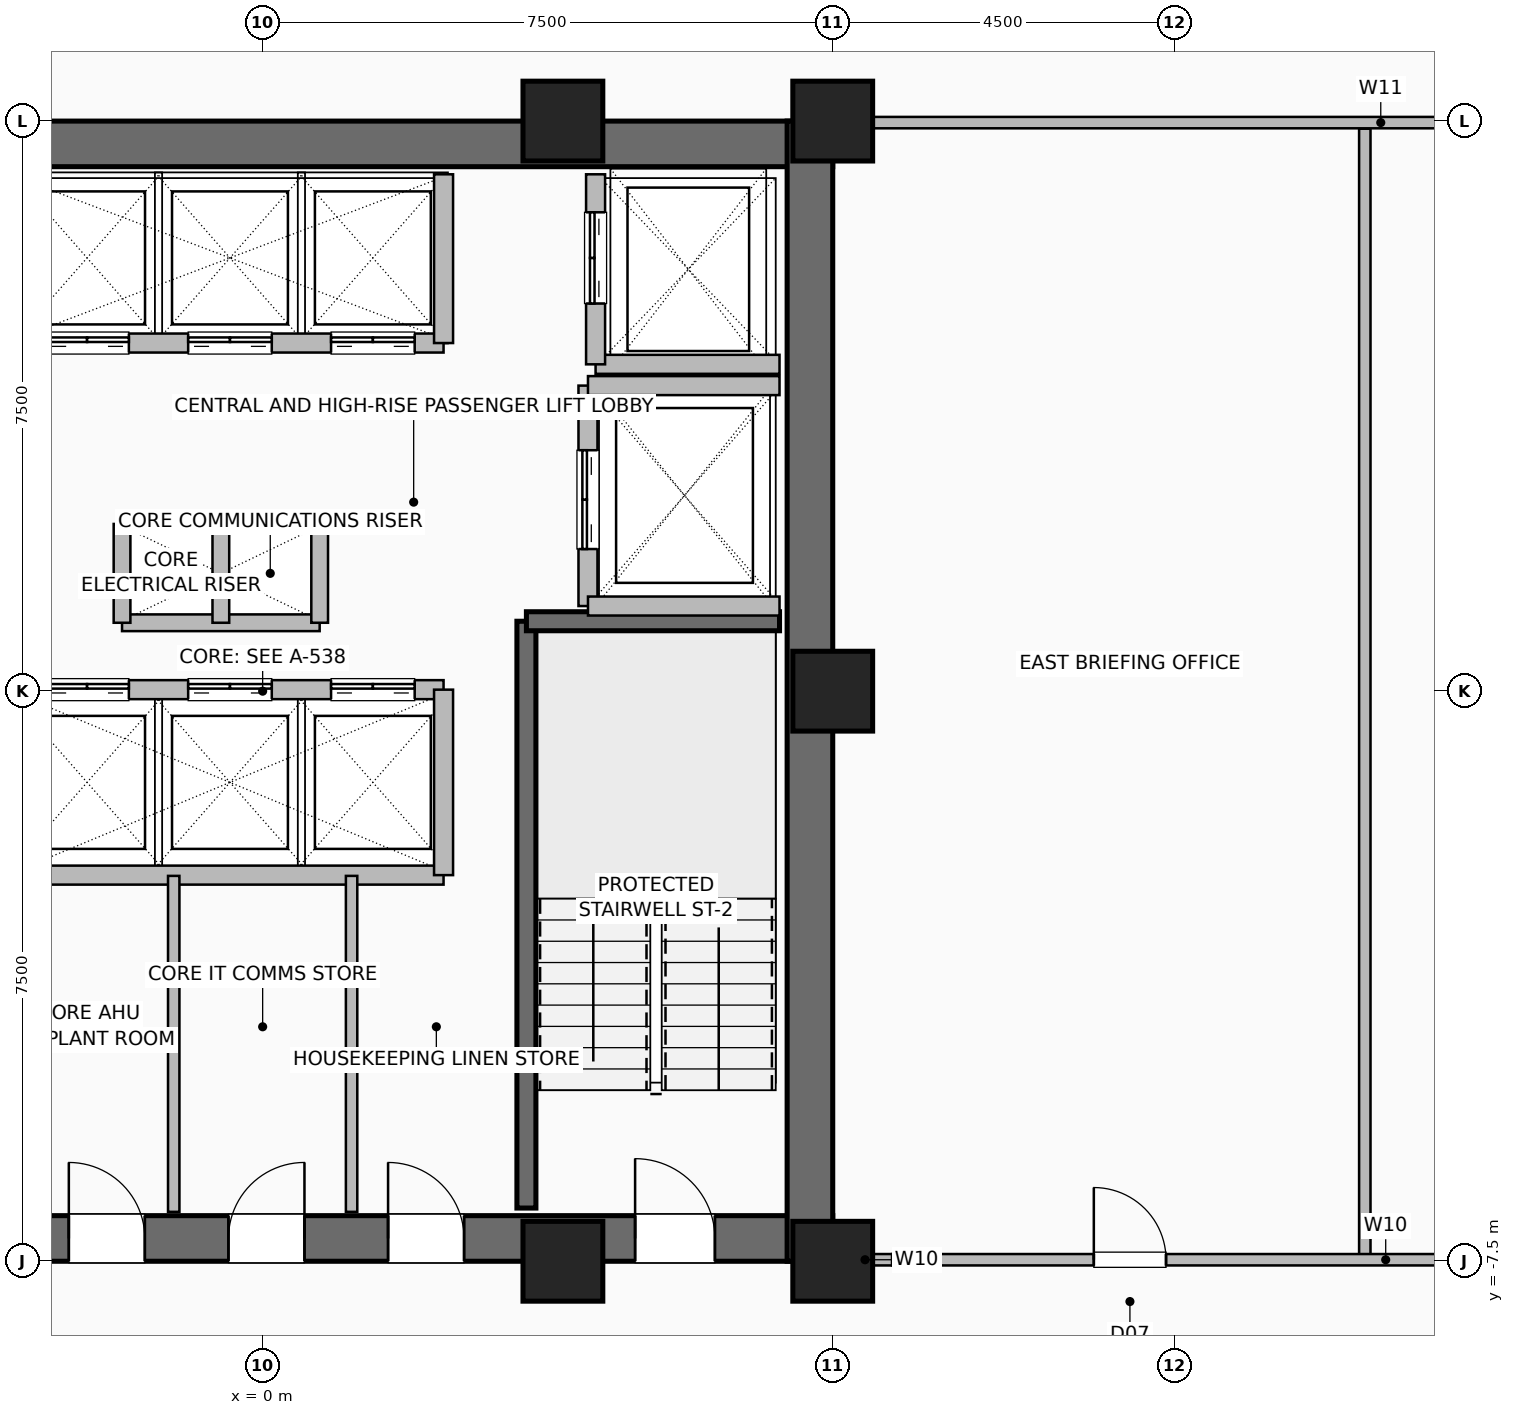
"""IFC4 building model, lengths in metres.
Left out: names, types, materials, properties, quantities, classifications, styles, units other than length and angle.
Written with IfcOpenShell. Run it as: python <this file> out.ifc"""

import sys

from ifc_helpers import new_model, si_unit, direction, frame, frame_2d, origin, origin_2d, place, context, subcontext, project, spatial, rectangle, hollow_rectangle, extrude, element, fill, save


model = new_model("IFC4")
c1 = context("Model", 3, precision=1e-05, world=origin(), true_north=direction((0.0, 1.0)))
c2 = subcontext(c1, "Body", "Model", "MODEL_VIEW")
j1 = project(units=[si_unit("LENGTHUNIT", "METRE"), si_unit("PLANEANGLEUNIT", "RADIAN")], contexts=[c1])
p1 = place(None, origin())
s1 = spatial("IfcSite", under=j1, at=p1, CompositionType="ELEMENT")
p2 = place(p1, origin())
s2 = spatial("IfcBuilding", under=s1, at=p2, CompositionType="ELEMENT")
p3 = place(p2, frame((0.0, 0.0, 144.4)))
s3 = spatial("IfcBuildingStorey", under=s2, at=p3, CompositionType="ELEMENT", Elevation=144.4)
for number, where, z_axis, x_axis in (
    (1, (3.95, -7.5, 0.0), (0.0, 0.0, 1.0), (1.0, 0.0, 0.0)),
    (2, (7.5, -7.5, 0.0), (0.0, 0.0, 1.0), (1.0, 0.0, 0.0)),
    (3, (7.5, 0.0, 0.0), (0.0, 0.0, 1.0), (1.0, 0.0, 0.0)),
    (4, (7.5, 7.5, 0.0), (0.0, 0.0, 1.0), (1.0, 0.0, 0.0)),
    (5, (3.95, 7.5, 0.0), (0.0, 0.0, 1.0), (1.0, 0.0, 0.0)),
):
    element("IfcColumn", number, at=place(p3, frame(where, z_axis=z_axis, x_axis=x_axis)), inside=s3, PredefinedType="COLUMN", context=c2, shape_type="SweptSolid", body=[
        extrude(hollow_rectangle(XDim=1.05, YDim=1.05, WallThickness=0.05, at=origin_2d()), origin(), (0.0, 0.0, 1.0), 3.6),
    ])
p4 = place(p3, frame((-7.5, -7.2, 0.0), z_axis=(0.0, 0.0, 1.0), x_axis=(1.0, 0.0, 0.0)))
e6 = element("IfcWall", 6, at=p4, inside=s3, PredefinedType="SHEAR", context=c2, shape_type="SweptSolid", body=[
    extrude(rectangle(XDim=15.0, YDim=0.6, at=frame_2d((7.5, 0.0))), origin(), (0.0, 0.0, 1.0), 3.36),
])
p5 = place(p4, frame((1.55, 0.0, 0.0)))
e7 = element("IfcOpeningElement", 7, at=p5, cuts=e6, PredefinedType="OPENING", context=c2, shape_type="SweptSolid", body=[
    extrude(rectangle(XDim=1.05, YDim=2.08, at=frame_2d((0.525, 1.04))), frame((0.0, 0.31, 0.0), z_axis=(0.0, -1.0, 0.0), x_axis=(1.0, 0.0, 0.0)), (0.0, 0.0, 1.0), 0.62),
])
p6 = place(p4, frame((12.4, 0.0, 0.0)))
e8 = element("IfcOpeningElement", 8, at=p6, cuts=e6, PredefinedType="OPENING", context=c2, shape_type="SweptSolid", body=[
    extrude(rectangle(XDim=1.05, YDim=2.08, at=frame_2d((0.525, 1.04))), frame((0.0, 0.31, 0.0), z_axis=(0.0, -1.0, 0.0), x_axis=(1.0, 0.0, 0.0)), (0.0, 0.0, 1.0), 0.62),
])
p7 = place(p4, frame((4.95, 0.0, 0.0)))
e9 = element("IfcOpeningElement", 9, at=p7, cuts=e6, PredefinedType="OPENING", context=c2, shape_type="SweptSolid", body=[
    extrude(rectangle(XDim=1.0, YDim=2.08, at=frame_2d((0.5, 1.04))), frame((0.0, 0.31, 0.0), z_axis=(0.0, -1.0, 0.0), x_axis=(1.0, 0.0, 0.0)), (0.0, 0.0, 1.0), 0.62),
])
p8 = place(p4, frame((7.05, 0.0, 0.0)))
e10 = element("IfcOpeningElement", 10, at=p8, cuts=e6, PredefinedType="OPENING", context=c2, shape_type="SweptSolid", body=[
    extrude(rectangle(XDim=1.0, YDim=2.08, at=frame_2d((0.5, 1.04))), frame((0.0, 0.31, 0.0), z_axis=(0.0, -1.0, 0.0), x_axis=(1.0, 0.0, 0.0)), (0.0, 0.0, 1.0), 0.62),
])
p9 = place(p4, frame((9.15, 0.0, 0.0)))
e11 = element("IfcOpeningElement", 11, at=p9, cuts=e6, PredefinedType="OPENING", context=c2, shape_type="SweptSolid", body=[
    extrude(rectangle(XDim=1.0, YDim=2.08, at=frame_2d((0.5, 1.04))), frame((0.0, 0.31, 0.0), z_axis=(0.0, -1.0, 0.0), x_axis=(1.0, 0.0, 0.0)), (0.0, 0.0, 1.0), 0.62),
])
for number, where, z_axis, x_axis in (
    (12, (-7.5, 7.2, 0.0), (0.0, 0.0, 1.0), (1.0, 0.0, 0.0)),
    (13, (7.2, -7.5, 0.0), (0.0, 0.0, 1.0), (0.0, 1.0, 0.0)),
):
    element("IfcWall", number, at=place(p3, frame(where, z_axis=z_axis, x_axis=x_axis)), inside=s3, PredefinedType="SHEAR", context=c2, shape_type="SweptSolid", body=[
        extrude(rectangle(XDim=15.0, YDim=0.6, at=frame_2d((7.5, 0.0))), origin(), (0.0, 0.0, 1.0), 3.36),
    ])
p10 = place(p3, frame((3.47, -6.8, 0.0), z_axis=(0.0, 0.0, 1.0), x_axis=(0.0, 1.0, 0.0)))
e14 = element("IfcWall", 14, at=p10, inside=s3, PredefinedType="SHEAR", context=c2, shape_type="SweptSolid", body=[
    extrude(rectangle(XDim=7.72, YDim=0.25, at=frame_2d((3.86, 0.0))), origin(), (0.0, 0.0, 1.0), 3.36),
])
p11 = place(p3, frame((3.47, 0.92, 0.0), z_axis=(0.0, 0.0, 1.0), x_axis=(1.0, 0.0, 0.0)))
e15 = element("IfcWall", 15, at=p11, inside=s3, PredefinedType="SHEAR", context=c2, shape_type="SweptSolid", body=[
    extrude(rectangle(XDim=3.33, YDim=0.25, at=frame_2d((1.665, 0.0))), origin(), (0.0, 0.0, 1.0), 3.36),
])
for number, where, z_axis, x_axis in (
    (16, (-1.85, 2.2, 0.0), (0.0, 0.0, 1.0), (1.0, 0.0, 0.0)),
    (17, (-1.85, 0.9, 0.0), (0.0, 0.0, 1.0), (1.0, 0.0, 0.0)),
):
    element("IfcWall", number, at=place(p3, frame(where, z_axis=z_axis, x_axis=x_axis)), inside=s3, PredefinedType="PARTITIONING", context=c2, shape_type="SweptSolid", body=[
        extrude(rectangle(XDim=2.6, YDim=0.22, at=frame_2d((1.3, 0.0))), origin(), (0.0, 0.0, 1.0), 3.36),
    ])
for number, where, z_axis, x_axis in (
    (18, (-0.55, 0.9, 0.0), (0.0, 0.0, 1.0), (0.0, 1.0, 0.0)),
    (19, (0.75, 0.9, 0.0), (0.0, 0.0, 1.0), (0.0, 1.0, 0.0)),
    (20, (-1.85, 0.9, 0.0), (0.0, 0.0, 1.0), (0.0, 1.0, 0.0)),
):
    element("IfcWall", number, at=place(p3, frame(where, z_axis=z_axis, x_axis=x_axis)), inside=s3, PredefinedType="PARTITIONING", context=c2, shape_type="SweptSolid", body=[
        extrude(rectangle(XDim=1.3, YDim=0.22, at=frame_2d((0.65, 0.0))), origin(), (0.0, 0.0, 1.0), 3.36),
    ])
p12 = place(p3, frame((-3.26, 0.02, 0.0), z_axis=(0.0, 0.0, 1.0), x_axis=(1.0, 0.0, 0.0)))
e21 = element("IfcWall", 21, at=p12, inside=s3, PredefinedType="SHEAR", context=c2, shape_type="SweptSolid", body=[
    extrude(rectangle(XDim=5.64, YDim=0.25, at=frame_2d((2.82, 0.0))), origin(), (0.0, 0.0, 1.0), 3.36),
])
p13 = place(p12, frame((0.4, 0.0, 0.0)))
e22 = element("IfcOpeningElement", 22, at=p13, cuts=e21, PredefinedType="OPENING", context=c2, shape_type="SweptSolid", body=[
    extrude(rectangle(XDim=1.1, YDim=2.2, at=frame_2d((0.55, 1.1))), frame((0.0, 0.135, 0.0), z_axis=(0.0, -1.0, 0.0), x_axis=(1.0, 0.0, 0.0)), (0.0, 0.0, 1.0), 0.27),
])
p14 = place(p12, frame((2.28, 0.0, 0.0)))
e23 = element("IfcOpeningElement", 23, at=p14, cuts=e21, PredefinedType="OPENING", context=c2, shape_type="SweptSolid", body=[
    extrude(rectangle(XDim=1.1, YDim=2.2, at=frame_2d((0.55, 1.1))), frame((0.0, 0.135, 0.0), z_axis=(0.0, -1.0, 0.0), x_axis=(1.0, 0.0, 0.0)), (0.0, 0.0, 1.0), 0.27),
])
p15 = place(p12, frame((4.16, 0.0, 0.0)))
e24 = element("IfcOpeningElement", 24, at=p15, cuts=e21, PredefinedType="OPENING", context=c2, shape_type="SweptSolid", body=[
    extrude(rectangle(XDim=1.1, YDim=2.2, at=frame_2d((0.55, 1.1))), frame((0.0, 0.135, 0.0), z_axis=(0.0, -1.0, 0.0), x_axis=(1.0, 0.0, 0.0)), (0.0, 0.0, 1.0), 0.27),
])
p16 = place(p3, frame((-3.26, -2.42, 0.0), z_axis=(0.0, 0.0, 1.0), x_axis=(1.0, 0.0, 0.0)))
e25 = element("IfcWall", 25, at=p16, inside=s3, PredefinedType="SHEAR", context=c2, shape_type="SweptSolid", body=[
    extrude(rectangle(XDim=5.64, YDim=0.25, at=frame_2d((2.82, 0.0))), origin(), (0.0, 0.0, 1.0), 3.36),
])
p17 = place(p3, frame((2.38, -2.42, 0.0), z_axis=(0.0, 0.0, 1.0), x_axis=(0.0, 1.0, 0.0)))
e26 = element("IfcWall", 26, at=p17, inside=s3, PredefinedType="SHEAR", context=c2, shape_type="SweptSolid", body=[
    extrude(rectangle(XDim=2.44, YDim=0.25, at=frame_2d((1.22, 0.0))), origin(), (0.0, 0.0, 1.0), 3.36),
])
p18 = place(p3, frame((-3.26, 4.58, 0.0), z_axis=(0.0, 0.0, 1.0), x_axis=(1.0, 0.0, 0.0)))
e27 = element("IfcWall", 27, at=p18, inside=s3, PredefinedType="SHEAR", context=c2, shape_type="SweptSolid", body=[
    extrude(rectangle(XDim=5.64, YDim=0.25, at=frame_2d((2.82, 0.0))), origin(), (0.0, 0.0, 1.0), 3.36),
])
p19 = place(p18, frame((0.4, 0.0, 0.0)))
e28 = element("IfcOpeningElement", 28, at=p19, cuts=e27, PredefinedType="OPENING", context=c2, shape_type="SweptSolid", body=[
    extrude(rectangle(XDim=1.1, YDim=2.2, at=frame_2d((0.55, 1.1))), frame((0.0, 0.135, 0.0), z_axis=(0.0, -1.0, 0.0), x_axis=(1.0, 0.0, 0.0)), (0.0, 0.0, 1.0), 0.27),
])
p20 = place(p18, frame((2.28, 0.0, 0.0)))
e29 = element("IfcOpeningElement", 29, at=p20, cuts=e27, PredefinedType="OPENING", context=c2, shape_type="SweptSolid", body=[
    extrude(rectangle(XDim=1.1, YDim=2.2, at=frame_2d((0.55, 1.1))), frame((0.0, 0.135, 0.0), z_axis=(0.0, -1.0, 0.0), x_axis=(1.0, 0.0, 0.0)), (0.0, 0.0, 1.0), 0.27),
])
p21 = place(p18, frame((4.16, 0.0, 0.0)))
e30 = element("IfcOpeningElement", 30, at=p21, cuts=e27, PredefinedType="OPENING", context=c2, shape_type="SweptSolid", body=[
    extrude(rectangle(XDim=1.1, YDim=2.2, at=frame_2d((0.55, 1.1))), frame((0.0, 0.135, 0.0), z_axis=(0.0, -1.0, 0.0), x_axis=(1.0, 0.0, 0.0)), (0.0, 0.0, 1.0), 0.27),
])
p22 = place(p3, frame((2.38, 4.58, 0.0), z_axis=(0.0, 0.0, 1.0), x_axis=(0.0, 1.0, 0.0)))
e31 = element("IfcWall", 31, at=p22, inside=s3, PredefinedType="SHEAR", context=c2, shape_type="SweptSolid", body=[
    extrude(rectangle(XDim=2.22, YDim=0.25, at=frame_2d((1.11, 0.0))), origin(), (0.0, 0.0, 1.0), 3.36),
])
p23 = place(p3, frame((4.38, 4.3, 0.0), z_axis=(0.0, 0.0, 1.0), x_axis=(1.0, 0.0, 0.0)))
e32 = element("IfcWall", 32, at=p23, inside=s3, PredefinedType="SHEAR", context=c2, shape_type="SweptSolid", body=[
    extrude(rectangle(XDim=2.42, YDim=0.25, at=frame_2d((1.21, 0.0))), origin(), (0.0, 0.0, 1.0), 3.36),
])
p24 = place(p3, frame((4.38, 4.3, 0.0), z_axis=(0.0, 0.0, 1.0), x_axis=(0.0, 1.0, 0.0)))
e33 = element("IfcWall", 33, at=p24, inside=s3, PredefinedType="SHEAR", context=c2, shape_type="SweptSolid", body=[
    extrude(rectangle(XDim=2.5, YDim=0.25, at=frame_2d((1.25, 0.0))), origin(), (0.0, 0.0, 1.0), 3.36),
])
p25 = place(p24, frame((0.8, 0.0, 0.0)))
e34 = element("IfcOpeningElement", 34, at=p25, cuts=e33, PredefinedType="OPENING", context=c2, shape_type="SweptSolid", body=[
    extrude(rectangle(XDim=1.2, YDim=2.2, at=frame_2d((0.6, 1.1))), frame((0.0, 0.135, 0.0), z_axis=(0.0, -1.0, 0.0), x_axis=(1.0, 0.0, 0.0)), (0.0, 0.0, 1.0), 0.27),
])
p26 = place(p3, frame((4.28, 1.12, 0.0), z_axis=(0.0, 0.0, 1.0), x_axis=(0.0, 1.0, 0.0)))
e35 = element("IfcWall", 35, at=p26, inside=s3, PredefinedType="SHEAR", context=c2, shape_type="SweptSolid", body=[
    extrude(rectangle(XDim=2.9, YDim=0.25, at=frame_2d((1.45, 0.0))), origin(), (0.0, 0.0, 1.0), 3.36),
])
p27 = place(p26, frame((0.75, 0.0, 0.0)))
e36 = element("IfcOpeningElement", 36, at=p27, cuts=e35, PredefinedType="OPENING", context=c2, shape_type="SweptSolid", body=[
    extrude(rectangle(XDim=1.3, YDim=2.3, at=frame_2d((0.65, 1.15))), frame((0.0, 0.135, 0.0), z_axis=(0.0, -1.0, 0.0), x_axis=(1.0, 0.0, 0.0)), (0.0, 0.0, 1.0), 0.27),
])
for number, where, z_axis, x_axis in (
    (37, (4.28, 1.12, 0.0), (0.0, 0.0, 1.0), (1.0, 0.0, 0.0)),
    (38, (4.28, 4.02, 0.0), (0.0, 0.0, 1.0), (1.0, 0.0, 0.0)),
):
    element("IfcWall", number, at=place(p3, frame(where, z_axis=z_axis, x_axis=x_axis)), inside=s3, PredefinedType="SHEAR", context=c2, shape_type="SweptSolid", body=[
        extrude(rectangle(XDim=2.52, YDim=0.25, at=frame_2d((1.26, 0.0))), origin(), (0.0, 0.0, 1.0), 3.36),
    ])
for number, where, z_axis, x_axis in (
    (39, (-1.17, -6.85, 0.0), (0.0, 0.0, 1.0), (0.0, 1.0, 0.0)),
    (40, (1.17, -6.85, 0.0), (0.0, 0.0, 1.0), (0.0, 1.0, 0.0)),
):
    element("IfcWall", number, at=place(p3, frame(where, z_axis=z_axis, x_axis=x_axis)), inside=s3, PredefinedType="PARTITIONING", context=c2, shape_type="SweptSolid", body=[
        extrude(rectangle(XDim=4.42, YDim=0.15, at=frame_2d((2.21, 0.0))), origin(), (0.0, 0.0, 1.0), 3.36),
    ])
p28 = place(p3, frame((7.45, -7.48, 0.0), z_axis=(0.0, 0.0, 1.0), x_axis=(1.0, 0.0, 0.0)))
e41 = element("IfcWall", 41, at=p28, inside=s3, PredefinedType="PARTITIONING", context=c2, shape_type="SweptSolid", body=[
    extrude(rectangle(XDim=0.95, YDim=0.15, at=frame_2d((0.475, 0.0))), origin(), (0.0, 0.0, 1.0), 3.36),
])
p29 = place(p3, frame((14.5, -7.48, 0.0), z_axis=(0.0, 0.0, 1.0), x_axis=(0.0, 1.0, 0.0)))
e42 = element("IfcWall", 42, at=p29, inside=s3, PredefinedType="PARTITIONING", context=c2, shape_type="SweptSolid", body=[
    extrude(rectangle(XDim=14.88, YDim=0.15, at=frame_2d((7.44, 0.0))), origin(), (0.0, 0.0, 1.0), 3.36),
])
p30 = place(p3, frame((8.28, -7.48, 0.0), z_axis=(0.0, 0.0, 1.0), x_axis=(1.0, 0.0, 0.0)))
e43 = element("IfcWall", 43, at=p30, inside=s3, PredefinedType="PARTITIONING", context=c2, shape_type="SweptSolid", body=[
    extrude(rectangle(XDim=13.54, YDim=0.15, at=frame_2d((6.77, 0.0))), origin(), (0.0, 0.0, 1.0), 3.36),
])
p31 = place(p30, frame((2.655, 0.0, 0.0)))
e44 = element("IfcOpeningElement", 44, at=p31, cuts=e43, PredefinedType="OPENING", context=c2, shape_type="SweptSolid", body=[
    extrude(rectangle(XDim=0.95, YDim=2.06, at=frame_2d((0.475, 1.03))), frame((0.0, 0.085, 0.0), z_axis=(0.0, -1.0, 0.0), x_axis=(1.0, 0.0, 0.0)), (0.0, 0.0, 1.0), 0.17),
])
p32 = place(p30, frame((9.385, 0.0, 0.0)))
e45 = element("IfcOpeningElement", 45, at=p32, cuts=e43, PredefinedType="OPENING", context=c2, shape_type="SweptSolid", body=[
    extrude(rectangle(XDim=0.95, YDim=2.06, at=frame_2d((0.475, 1.03))), frame((0.0, 0.085, 0.0), z_axis=(0.0, -1.0, 0.0), x_axis=(1.0, 0.0, 0.0)), (0.0, 0.0, 1.0), 0.17),
])
p33 = place(p3, frame((7.6, 7.48, 0.0), z_axis=(0.0, 0.0, 1.0), x_axis=(1.0, 0.0, 0.0)))
e46 = element("IfcWall", 46, at=p33, inside=s3, PredefinedType="PARTITIONING", context=c2, shape_type="SweptSolid", body=[
    extrude(rectangle(XDim=14.22, YDim=0.15, at=frame_2d((7.11, 0.0))), origin(), (0.0, 0.0, 1.0), 3.36),
])
p34 = place(p6, origin())
e47 = element("IfcDoor", 47, at=p34, inside=s3, OperationType="SINGLE_SWING_LEFT", PredefinedType="DOOR", context=c2, shape_type="SweptSolid", body=[
    extrude(rectangle(XDim=1.05, YDim=2.08, at=frame_2d((0.525, 1.04))), frame((0.0, 0.025, 0.0), z_axis=(0.0, -1.0, 0.0), x_axis=(1.0, 0.0, 0.0)), (0.0, 0.0, 1.0), 0.05),
])
fill(e8, e47)
p35 = place(p7, origin())
e48 = element("IfcDoor", 48, at=p35, inside=s3, OperationType="SINGLE_SWING_LEFT", PredefinedType="DOOR", context=c2, shape_type="SweptSolid", body=[
    extrude(rectangle(XDim=1.0, YDim=2.08, at=frame_2d((0.5, 1.04))), frame((0.0, 0.025, 0.0), z_axis=(0.0, -1.0, 0.0), x_axis=(1.0, 0.0, 0.0)), (0.0, 0.0, 1.0), 0.05),
])
fill(e9, e48)
p36 = place(p8, origin())
e49 = element("IfcDoor", 49, at=p36, inside=s3, OperationType="SINGLE_SWING_RIGHT", PredefinedType="DOOR", context=c2, shape_type="SweptSolid", body=[
    extrude(rectangle(XDim=1.0, YDim=2.08, at=frame_2d((0.5, 1.04))), frame((0.0, 0.025, 0.0), z_axis=(0.0, -1.0, 0.0), x_axis=(1.0, 0.0, 0.0)), (0.0, 0.0, 1.0), 0.05),
])
fill(e10, e49)
p37 = place(p9, origin())
e50 = element("IfcDoor", 50, at=p37, inside=s3, OperationType="SINGLE_SWING_LEFT", PredefinedType="DOOR", context=c2, shape_type="SweptSolid", body=[
    extrude(rectangle(XDim=1.0, YDim=2.08, at=frame_2d((0.5, 1.04))), frame((0.0, 0.025, 0.0), z_axis=(0.0, -1.0, 0.0), x_axis=(1.0, 0.0, 0.0)), (0.0, 0.0, 1.0), 0.05),
])
fill(e11, e50)
p38 = place(p13, origin())
e51 = element("IfcDoor", 51, at=p38, inside=s3, OperationType="DOUBLE_DOOR_SLIDING", PredefinedType="DOOR", context=c2, shape_type="SweptSolid", body=[
    extrude(rectangle(XDim=1.1, YDim=2.2, at=frame_2d((0.55, 1.1))), frame((0.0, 0.025, 0.0), z_axis=(0.0, -1.0, 0.0), x_axis=(1.0, 0.0, 0.0)), (0.0, 0.0, 1.0), 0.05),
])
fill(e22, e51)
p39 = place(p14, origin())
e52 = element("IfcDoor", 52, at=p39, inside=s3, OperationType="DOUBLE_DOOR_SLIDING", PredefinedType="DOOR", context=c2, shape_type="SweptSolid", body=[
    extrude(rectangle(XDim=1.1, YDim=2.2, at=frame_2d((0.55, 1.1))), frame((0.0, 0.025, 0.0), z_axis=(0.0, -1.0, 0.0), x_axis=(1.0, 0.0, 0.0)), (0.0, 0.0, 1.0), 0.05),
])
fill(e23, e52)
p40 = place(p15, origin())
e53 = element("IfcDoor", 53, at=p40, inside=s3, OperationType="DOUBLE_DOOR_SLIDING", PredefinedType="DOOR", context=c2, shape_type="SweptSolid", body=[
    extrude(rectangle(XDim=1.1, YDim=2.2, at=frame_2d((0.55, 1.1))), frame((0.0, 0.025, 0.0), z_axis=(0.0, -1.0, 0.0), x_axis=(1.0, 0.0, 0.0)), (0.0, 0.0, 1.0), 0.05),
])
fill(e24, e53)
p41 = place(p19, origin())
e54 = element("IfcDoor", 54, at=p41, inside=s3, OperationType="DOUBLE_DOOR_SLIDING", PredefinedType="DOOR", context=c2, shape_type="SweptSolid", body=[
    extrude(rectangle(XDim=1.1, YDim=2.2, at=frame_2d((0.55, 1.1))), frame((0.0, 0.025, 0.0), z_axis=(0.0, -1.0, 0.0), x_axis=(1.0, 0.0, 0.0)), (0.0, 0.0, 1.0), 0.05),
])
fill(e28, e54)
p42 = place(p20, origin())
e55 = element("IfcDoor", 55, at=p42, inside=s3, OperationType="DOUBLE_DOOR_SLIDING", PredefinedType="DOOR", context=c2, shape_type="SweptSolid", body=[
    extrude(rectangle(XDim=1.1, YDim=2.2, at=frame_2d((0.55, 1.1))), frame((0.0, 0.025, 0.0), z_axis=(0.0, -1.0, 0.0), x_axis=(1.0, 0.0, 0.0)), (0.0, 0.0, 1.0), 0.05),
])
fill(e29, e55)
p43 = place(p21, origin())
e56 = element("IfcDoor", 56, at=p43, inside=s3, OperationType="DOUBLE_DOOR_SLIDING", PredefinedType="DOOR", context=c2, shape_type="SweptSolid", body=[
    extrude(rectangle(XDim=1.1, YDim=2.2, at=frame_2d((0.55, 1.1))), frame((0.0, 0.025, 0.0), z_axis=(0.0, -1.0, 0.0), x_axis=(1.0, 0.0, 0.0)), (0.0, 0.0, 1.0), 0.05),
])
fill(e30, e56)
p44 = place(p25, origin())
e57 = element("IfcDoor", 57, at=p44, inside=s3, OperationType="DOUBLE_DOOR_SLIDING", PredefinedType="DOOR", context=c2, shape_type="SweptSolid", body=[
    extrude(rectangle(XDim=1.2, YDim=2.2, at=frame_2d((0.6, 1.1))), frame((0.0, 0.025, 0.0), z_axis=(0.0, -1.0, 0.0), x_axis=(1.0, 0.0, 0.0)), (0.0, 0.0, 1.0), 0.05),
])
fill(e34, e57)
p45 = place(p27, origin())
e58 = element("IfcDoor", 58, at=p45, inside=s3, OperationType="DOUBLE_DOOR_SLIDING", PredefinedType="DOOR", context=c2, shape_type="SweptSolid", body=[
    extrude(rectangle(XDim=1.3, YDim=2.3, at=frame_2d((0.65, 1.15))), frame((0.0, 0.025, 0.0), z_axis=(0.0, -1.0, 0.0), x_axis=(1.0, 0.0, 0.0)), (0.0, 0.0, 1.0), 0.05),
])
fill(e36, e58)
p46 = place(p31, origin())
e59 = element("IfcDoor", 59, at=p46, inside=s3, OperationType="SINGLE_SWING_LEFT", PredefinedType="DOOR", context=c2, shape_type="SweptSolid", body=[
    extrude(rectangle(XDim=0.95, YDim=2.06, at=frame_2d((0.475, 1.03))), frame((0.0, 0.025, 0.0), z_axis=(0.0, -1.0, 0.0), x_axis=(1.0, 0.0, 0.0)), (0.0, 0.0, 1.0), 0.05),
])
fill(e44, e59)
save(model, sys.argv[1])
